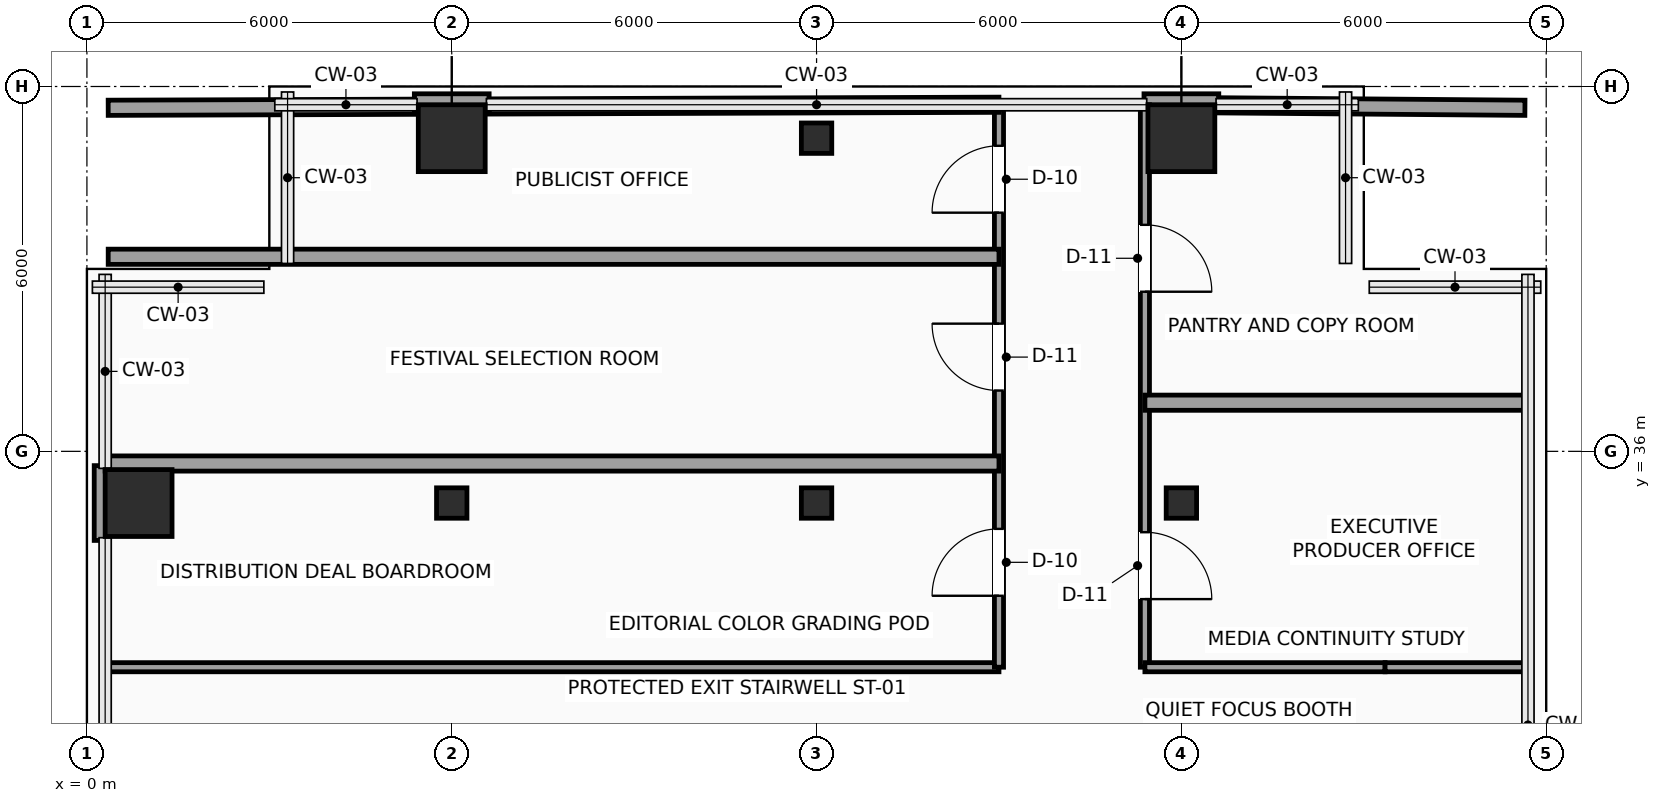
"""IFC4 building model, lengths in metres.
Left out: names, types, materials, properties, quantities, classifications, styles, units other than length and angle.
Written with IfcOpenShell. Run it as: python <this file> out.ifc"""

import sys

from ifc_helpers import new_model, si_unit, direction, frame, frame_2d, origin, origin_2d, place, context, subcontext, project, spatial, rectangle, hollow_rectangle, extrude, element, fill, save


model = new_model("IFC4")
c1 = context("Model", 3, precision=1e-05, world=origin(), true_north=direction((0.0, 1.0)))
c2 = subcontext(c1, "Body", "Model", "MODEL_VIEW")
j1 = project(units=[si_unit("LENGTHUNIT", "METRE"), si_unit("PLANEANGLEUNIT", "RADIAN")], contexts=[c1])
p1 = place(None, origin())
s1 = spatial("IfcSite", under=j1, at=p1, CompositionType="ELEMENT")
p2 = place(p1, origin())
s2 = spatial("IfcBuilding", under=s1, at=p2, CompositionType="ELEMENT")
p3 = place(p2, frame((0.0, 0.0, 126.9)))
s3 = spatial("IfcBuildingStorey", under=s2, at=p3, CompositionType="ELEMENT", Elevation=126.9)
p4 = place(p3, frame((0.85, 35.15, 0.0), z_axis=(0.0, 0.0, 1.0), x_axis=(1.0, 0.0, 0.0)))
e1 = element("IfcColumn", 1, at=p4, inside=s3, PredefinedType="COLUMN", context=c2, shape_type="SweptSolid", body=[
    extrude(rectangle(XDim=1.1, YDim=1.1, at=origin_2d()), origin(), (0.0, 0.0, 1.0), 3.75),
])
p5 = place(p3, frame((6.0, 35.15, 0.0), z_axis=(0.0, 0.0, 1.0), x_axis=(1.0, 0.0, 0.0)))
e2 = element("IfcColumn", 2, at=p5, inside=s3, PredefinedType="COLUMN", context=c2, shape_type="SweptSolid", body=[
    extrude(hollow_rectangle(XDim=0.5, YDim=0.5, WallThickness=0.025, InnerFilletRadius=0.025, OuterFilletRadius=0.04, at=origin_2d()), origin(), (0.0, 0.0, 1.0), 3.75),
])
p6 = place(p3, frame((6.0, 41.15, 0.0), z_axis=(0.0, 0.0, 1.0), x_axis=(1.0, 0.0, 0.0)))
e3 = element("IfcColumn", 3, at=p6, inside=s3, PredefinedType="COLUMN", context=c2, shape_type="SweptSolid", body=[
    extrude(rectangle(XDim=1.1, YDim=1.1, at=origin_2d()), origin(), (0.0, 0.0, 1.0), 3.75),
])
for number, where, z_axis, x_axis in (
    (4, (12.0, 35.15, 0.0), (0.0, 0.0, 1.0), (1.0, 0.0, 0.0)),
    (5, (12.0, 41.15, 0.0), (0.0, 0.0, 1.0), (1.0, 0.0, 0.0)),
    (6, (18.0, 35.15, 0.0), (0.0, 0.0, 1.0), (1.0, 0.0, 0.0)),
):
    element("IfcColumn", number, at=place(p3, frame(where, z_axis=z_axis, x_axis=x_axis)), inside=s3, PredefinedType="COLUMN", context=c2, shape_type="SweptSolid", body=[
        extrude(hollow_rectangle(XDim=0.5, YDim=0.5, WallThickness=0.025, InnerFilletRadius=0.025, OuterFilletRadius=0.04, at=origin_2d()), origin(), (0.0, 0.0, 1.0), 3.75),
    ])
p7 = place(p3, frame((18.0, 41.15, 0.0), z_axis=(0.0, 0.0, 1.0), x_axis=(1.0, 0.0, 0.0)))
e7 = element("IfcColumn", 7, at=p7, inside=s3, PredefinedType="COLUMN", context=c2, shape_type="SweptSolid", body=[
    extrude(rectangle(XDim=1.1, YDim=1.1, at=origin_2d()), origin(), (0.0, 0.0, 1.0), 3.75),
])
for number, where, z_axis, x_axis in (
    (8, (0.24, 34.535, 0.0), (0.0, 0.0, 1.0), (0.0, 1.0, 0.0)),
    (9, (5.385, 41.76, 0.0), (0.0, 0.0, 1.0), (1.0, 0.0, 0.0)),
    (10, (17.385, 41.76, 0.0), (0.0, 0.0, 1.0), (1.0, 0.0, 0.0)),
):
    element("IfcWall", number, at=place(p3, frame(where, z_axis=z_axis, x_axis=x_axis)), inside=s3, PredefinedType="SOLIDWALL", context=c2, shape_type="SweptSolid", body=[
        extrude(rectangle(XDim=1.23, YDim=0.24, at=frame_2d((0.615, 0.0))), origin(), (0.0, 0.0, 1.0), 3.525),
    ])
p8 = place(p3, frame((0.3, 32.45, 0.0), z_axis=(0.0, 0.0, 1.0), x_axis=(1.0, 0.0, 0.0)))
e11 = element("IfcWall", 11, at=p8, inside=s3, PredefinedType="PARTITIONING", context=c2, shape_type="SweptSolid", body=[
    extrude(rectangle(XDim=14.7, YDim=0.15, at=frame_2d((7.35, 0.0))), origin(), (0.0, 0.0, 1.0), 3.525),
])
p9 = place(p3, frame((15.0, 32.45, 0.0), z_axis=(0.0, 0.0, 1.0), x_axis=(0.0, 1.0, 0.0)))
e12 = element("IfcWall", 12, at=p9, inside=s3, PredefinedType="PARTITIONING", context=c2, shape_type="SweptSolid", body=[
    extrude(rectangle(XDim=9.25, YDim=0.15, at=frame_2d((4.625, 0.0))), origin(), (0.0, 0.0, 1.0), 3.525),
])
p10 = place(p9, frame((1.175, 0.0, 0.0)))
e13 = element("IfcOpeningElement", 13, at=p10, cuts=e12, PredefinedType="OPENING", context=c2, shape_type="SweptSolid", body=[
    extrude(rectangle(XDim=1.1, YDim=2.25, at=frame_2d((0.55, 1.125))), frame((0.0, 0.085, 0.0), z_axis=(0.0, -1.0, 0.0), x_axis=(1.0, 0.0, 0.0)), (0.0, 0.0, 1.0), 0.17),
])
p11 = place(p9, frame((4.55, 0.0, 0.0)))
e14 = element("IfcOpeningElement", 14, at=p11, cuts=e12, PredefinedType="OPENING", context=c2, shape_type="SweptSolid", body=[
    extrude(rectangle(XDim=1.1, YDim=2.25, at=frame_2d((0.55, 1.125))), frame((0.0, 0.085, 0.0), z_axis=(0.0, -1.0, 0.0), x_axis=(1.0, 0.0, 0.0)), (0.0, 0.0, 1.0), 0.17),
])
p12 = place(p9, frame((7.475, 0.0, 0.0)))
e15 = element("IfcOpeningElement", 15, at=p12, cuts=e12, PredefinedType="OPENING", context=c2, shape_type="SweptSolid", body=[
    extrude(rectangle(XDim=1.1, YDim=2.25, at=frame_2d((0.55, 1.125))), frame((0.0, 0.085, 0.0), z_axis=(0.0, -1.0, 0.0), x_axis=(1.0, 0.0, 0.0)), (0.0, 0.0, 1.0), 0.17),
])
p13 = place(p3, frame((17.4, 41.7, 0.0), z_axis=(0.0, 0.0, 1.0), x_axis=(0.0, -1.0, 0.0)))
e16 = element("IfcWall", 16, at=p13, inside=s3, PredefinedType="PARTITIONING", context=c2, shape_type="SweptSolid", body=[
    extrude(rectangle(XDim=9.25, YDim=0.15, at=frame_2d((4.625, 0.0))), origin(), (0.0, 0.0, 1.0), 3.525),
])
p14 = place(p13, frame((7.03, 0.0, 0.0)))
e17 = element("IfcOpeningElement", 17, at=p14, cuts=e16, PredefinedType="OPENING", context=c2, shape_type="SweptSolid", body=[
    extrude(rectangle(XDim=1.1, YDim=2.25, at=frame_2d((0.55, 1.125))), frame((0.0, 0.085, 0.0), z_axis=(0.0, -1.0, 0.0), x_axis=(1.0, 0.0, 0.0)), (0.0, 0.0, 1.0), 0.17),
])
p15 = place(p13, frame((1.975, 0.0, 0.0)))
e18 = element("IfcOpeningElement", 18, at=p15, cuts=e16, PredefinedType="OPENING", context=c2, shape_type="SweptSolid", body=[
    extrude(rectangle(XDim=1.1, YDim=2.25, at=frame_2d((0.55, 1.125))), frame((0.0, 0.085, 0.0), z_axis=(0.0, -1.0, 0.0), x_axis=(1.0, 0.0, 0.0)), (0.0, 0.0, 1.0), 0.17),
])
p16 = place(p3, frame((17.4, 32.45, 0.0), z_axis=(0.0, 0.0, 1.0), x_axis=(1.0, 0.0, 0.0)))
e19 = element("IfcWall", 19, at=p16, inside=s3, PredefinedType="PARTITIONING", context=c2, shape_type="SweptSolid", body=[
    extrude(rectangle(XDim=3.95, YDim=0.15, at=frame_2d((1.975, 0.0))), origin(), (0.0, 0.0, 1.0), 3.525),
])
p17 = place(p3, frame((21.35, 32.45, 0.0), z_axis=(0.0, 0.0, 1.0), x_axis=(1.0, 0.0, 0.0)))
e20 = element("IfcWall", 20, at=p17, inside=s3, PredefinedType="PARTITIONING", context=c2, shape_type="SweptSolid", body=[
    extrude(rectangle(XDim=2.35, YDim=0.15, at=frame_2d((1.175, 0.0))), origin(), (0.0, 0.0, 1.0), 3.525),
])
p18 = place(p3, frame((0.3, 35.8, 0.0), z_axis=(0.0, 0.0, 1.0), x_axis=(1.0, 0.0, 0.0)))
e21 = element("IfcWall", 21, at=p18, inside=s3, PredefinedType="PARTITIONING", context=c2, shape_type="SweptSolid", body=[
    extrude(rectangle(XDim=14.7, YDim=0.25, at=frame_2d((7.35, 0.0))), origin(), (0.0, 0.0, 1.0), 3.525),
])
p19 = place(p3, frame((0.35, 39.2, 0.0), z_axis=(0.0, 0.0, 1.0), x_axis=(1.0, 0.0, 0.0)))
e22 = element("IfcWall", 22, at=p19, inside=s3, PredefinedType="PARTITIONING", context=c2, shape_type="SweptSolid", body=[
    extrude(rectangle(XDim=14.65, YDim=0.25, at=frame_2d((7.325, 0.0))), origin(), (0.0, 0.0, 1.0), 3.525),
])
p20 = place(p3, frame((0.35, 41.65, 0.0), z_axis=(0.0, 0.0, 1.0), x_axis=(0.999994073761, 0.003442737683, 0.0)))
e23 = element("IfcWall", 23, at=p20, inside=s3, PredefinedType="PARTITIONING", context=c2, shape_type="SweptSolid", body=[
    extrude(rectangle(XDim=5.035, YDim=0.25, at=frame_2d((2.518, 0.0))), origin(), (0.0, 0.0, 1.0), 3.525),
])
p21 = place(p3, frame((6.615, 41.671, 0.0), z_axis=(0.0, 0.0, 1.0), x_axis=(0.999994197557, 0.003406589638, 0.0)))
e24 = element("IfcWall", 24, at=p21, inside=s3, PredefinedType="PARTITIONING", context=c2, shape_type="SweptSolid", body=[
    extrude(rectangle(XDim=8.385, YDim=0.25, at=frame_2d((4.192, 0.0))), origin(), (0.0, 0.0, 1.0), 3.525),
])
p22 = place(p3, frame((17.4, 36.8, 0.0), z_axis=(0.0, 0.0, 1.0), x_axis=(1.0, 0.0, 0.0)))
e25 = element("IfcWall", 25, at=p22, inside=s3, PredefinedType="PARTITIONING", context=c2, shape_type="SweptSolid", body=[
    extrude(rectangle(XDim=6.3, YDim=0.25, at=frame_2d((3.15, 0.0))), origin(), (0.0, 0.0, 1.0), 3.525),
])
p23 = place(p3, frame((18.615, 41.69, 0.0), z_axis=(0.0, 0.0, 1.0), x_axis=(0.99996799533, -0.008000519771, 0.0)))
e26 = element("IfcWall", 26, at=p23, inside=s3, PredefinedType="PARTITIONING", context=c2, shape_type="SweptSolid", body=[
    extrude(rectangle(XDim=5.035, YDim=0.25, at=frame_2d((2.518, 0.0))), origin(), (0.0, 0.0, 1.0), 3.525),
])
p24 = place(p10, origin())
e27 = element("IfcDoor", 27, at=p24, inside=s3, OperationType="SINGLE_SWING_LEFT", PredefinedType="DOOR", context=c2, shape_type="SweptSolid", body=[
    extrude(rectangle(XDim=1.1, YDim=2.25, at=frame_2d((0.55, 1.125))), frame((0.0, 0.025, 0.0), z_axis=(0.0, -1.0, 0.0), x_axis=(1.0, 0.0, 0.0)), (0.0, 0.0, 1.0), 0.05),
])
fill(e13, e27)
p25 = place(p11, origin())
e28 = element("IfcDoor", 28, at=p25, inside=s3, OperationType="SINGLE_SWING_RIGHT", PredefinedType="DOOR", context=c2, shape_type="SweptSolid", body=[
    extrude(rectangle(XDim=1.1, YDim=2.25, at=frame_2d((0.55, 1.125))), frame((0.0, 0.025, 0.0), z_axis=(0.0, -1.0, 0.0), x_axis=(1.0, 0.0, 0.0)), (0.0, 0.0, 1.0), 0.05),
])
fill(e14, e28)
p26 = place(p12, origin())
e29 = element("IfcDoor", 29, at=p26, inside=s3, OperationType="SINGLE_SWING_LEFT", PredefinedType="DOOR", context=c2, shape_type="SweptSolid", body=[
    extrude(rectangle(XDim=1.1, YDim=2.25, at=frame_2d((0.55, 1.125))), frame((0.0, 0.025, 0.0), z_axis=(0.0, -1.0, 0.0), x_axis=(1.0, 0.0, 0.0)), (0.0, 0.0, 1.0), 0.05),
])
fill(e15, e29)
p27 = place(p14, origin())
e30 = element("IfcDoor", 30, at=p27, inside=s3, OperationType="SINGLE_SWING_RIGHT", PredefinedType="DOOR", context=c2, shape_type="SweptSolid", body=[
    extrude(rectangle(XDim=1.1, YDim=2.25, at=frame_2d((0.55, 1.125))), frame((0.0, 0.025, 0.0), z_axis=(0.0, -1.0, 0.0), x_axis=(1.0, 0.0, 0.0)), (0.0, 0.0, 1.0), 0.05),
])
fill(e17, e30)
p28 = place(p15, origin())
e31 = element("IfcDoor", 31, at=p28, inside=s3, OperationType="SINGLE_SWING_RIGHT", PredefinedType="DOOR", context=c2, shape_type="SweptSolid", body=[
    extrude(rectangle(XDim=1.1, YDim=2.25, at=frame_2d((0.55, 1.125))), frame((0.0, 0.025, 0.0), z_axis=(0.0, -1.0, 0.0), x_axis=(1.0, 0.0, 0.0)), (0.0, 0.0, 1.0), 0.05),
])
fill(e18, e31)
save(model, sys.argv[1])
